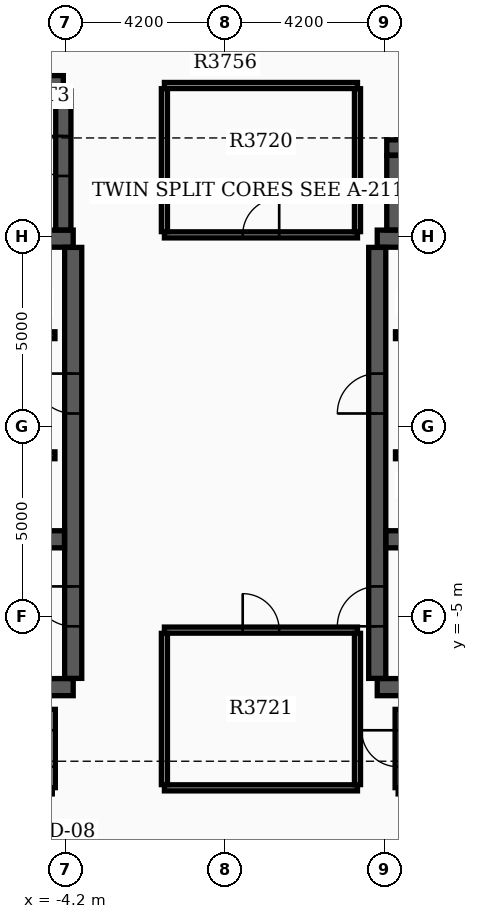
"""IFC4 building model, lengths in metres.
Left out: names, types, materials, properties, quantities, classifications, styles, units other than length and angle.
Written with IfcOpenShell. Run it as: python <this file> out.ifc"""

import sys

from ifc_helpers import new_model, si_unit, direction, frame, frame_2d, origin, place, context, subcontext, project, spatial, rectangle, extrude, element, fill, save


model = new_model("IFC4")
c1 = context("Model", 3, precision=1e-05, world=origin(), true_north=direction((0.0, 1.0)))
c2 = subcontext(c1, "Body", "Model", "MODEL_VIEW")
j1 = project(units=[si_unit("LENGTHUNIT", "METRE"), si_unit("PLANEANGLEUNIT", "RADIAN")], contexts=[c1])
p1 = place(None, origin())
s1 = spatial("IfcSite", under=j1, at=p1, CompositionType="ELEMENT")
p2 = place(p1, origin())
s2 = spatial("IfcBuilding", under=s1, at=p2, CompositionType="ELEMENT")
p3 = place(p2, frame((0.0, 0.0, 232.5)))
s3 = spatial("IfcBuildingStorey", under=s2, at=p3, CompositionType="ELEMENT", Elevation=232.5)
for number, where, z_axis, x_axis in (
    (1, (-12.4, -6.85, 0.0), (0.0, 0.0, 1.0), (1.0, 0.0, 0.0)),
    (2, (-12.4, 4.95, 0.0), (0.0, 0.0, 1.0), (1.0, 0.0, 0.0)),
):
    element("IfcWall", number, at=place(p3, frame(where, z_axis=z_axis, x_axis=x_axis)), inside=s3, PredefinedType="SHEAR", context=c2, shape_type="SweptSolid", body=[
        extrude(rectangle(XDim=8.4, YDim=0.45, at=frame_2d((4.2, 0.0))), origin(), (0.0, 0.0, 1.0), 3.7),
    ])
p4 = place(p3, frame((-4.0, -6.62, 0.0), z_axis=(0.0, 0.0, 1.0), x_axis=(0.0, 1.0, 0.0)))
e3 = element("IfcWall", 3, at=p4, inside=s3, PredefinedType="SHEAR", context=c2, shape_type="SweptSolid", body=[
    extrude(rectangle(XDim=11.34, YDim=0.45, at=frame_2d((5.67, 0.0))), origin(), (0.0, 0.0, 1.0), 3.7),
])
p5 = place(p4, frame((1.37, 0.0, 0.0)))
e4 = element("IfcOpeningElement", 4, at=p5, cuts=e3, PredefinedType="OPENING", context=c2, shape_type="SweptSolid", body=[
    extrude(rectangle(XDim=1.05, YDim=2.15, at=frame_2d((0.525, 1.075))), frame((0.0, 0.235, 0.0), z_axis=(0.0, -1.0, 0.0), x_axis=(1.0, 0.0, 0.0)), (0.0, 0.0, 1.0), 0.47),
])
p6 = place(p4, frame((6.97, 0.0, 0.0)))
e5 = element("IfcOpeningElement", 5, at=p6, cuts=e3, PredefinedType="OPENING", context=c2, shape_type="SweptSolid", body=[
    extrude(rectangle(XDim=1.05, YDim=2.15, at=frame_2d((0.525, 1.075))), frame((0.0, 0.235, 0.0), z_axis=(0.0, -1.0, 0.0), x_axis=(1.0, 0.0, 0.0)), (0.0, 0.0, 1.0), 0.47),
])
p7 = place(p3, frame((-12.17, -2.96, 0.0), z_axis=(0.0, 0.0, 1.0), x_axis=(1.0, 0.0, 0.0)))
e6 = element("IfcWall", 6, at=p7, inside=s3, PredefinedType="SHEAR", context=c2, shape_type="SweptSolid", body=[
    extrude(rectangle(XDim=7.94, YDim=0.45, at=frame_2d((3.97, 0.0))), origin(), (0.0, 0.0, 1.0), 3.7),
])
for number, where, z_axis, x_axis in (
    (7, (4.0, -6.85, 0.0), (0.0, 0.0, 1.0), (1.0, 0.0, 0.0)),
    (8, (4.0, 4.95, 0.0), (0.0, 0.0, 1.0), (1.0, 0.0, 0.0)),
):
    element("IfcWall", number, at=place(p3, frame(where, z_axis=z_axis, x_axis=x_axis)), inside=s3, PredefinedType="SHEAR", context=c2, shape_type="SweptSolid", body=[
        extrude(rectangle(XDim=8.4, YDim=0.45, at=frame_2d((4.2, 0.0))), origin(), (0.0, 0.0, 1.0), 3.7),
    ])
p8 = place(p3, frame((4.0, -6.62, 0.0), z_axis=(0.0, 0.0, 1.0), x_axis=(0.0, 1.0, 0.0)))
e9 = element("IfcWall", 9, at=p8, inside=s3, PredefinedType="SHEAR", context=c2, shape_type="SweptSolid", body=[
    extrude(rectangle(XDim=11.34, YDim=0.45, at=frame_2d((5.67, 0.0))), origin(), (0.0, 0.0, 1.0), 3.7),
])
p9 = place(p8, frame((1.37, 0.0, 0.0)))
e10 = element("IfcOpeningElement", 10, at=p9, cuts=e9, PredefinedType="OPENING", context=c2, shape_type="SweptSolid", body=[
    extrude(rectangle(XDim=1.05, YDim=2.15, at=frame_2d((0.525, 1.075))), frame((0.0, 0.235, 0.0), z_axis=(0.0, -1.0, 0.0), x_axis=(1.0, 0.0, 0.0)), (0.0, 0.0, 1.0), 0.47),
])
p10 = place(p8, frame((6.97, 0.0, 0.0)))
e11 = element("IfcOpeningElement", 11, at=p10, cuts=e9, PredefinedType="OPENING", context=c2, shape_type="SweptSolid", body=[
    extrude(rectangle(XDim=1.05, YDim=2.15, at=frame_2d((0.525, 1.075))), frame((0.0, 0.235, 0.0), z_axis=(0.0, -1.0, 0.0), x_axis=(1.0, 0.0, 0.0)), (0.0, 0.0, 1.0), 0.47),
])
p11 = place(p3, frame((4.23, -2.96, 0.0), z_axis=(0.0, 0.0, 1.0), x_axis=(1.0, 0.0, 0.0)))
e12 = element("IfcWall", 12, at=p11, inside=s3, PredefinedType="SHEAR", context=c2, shape_type="SweptSolid", body=[
    extrude(rectangle(XDim=7.94, YDim=0.45, at=frame_2d((3.97, 0.0))), origin(), (0.0, 0.0, 1.0), 3.7),
])
p12 = place(p3, frame((-12.22, 9.04, 0.0), z_axis=(0.0, 0.0, 1.0), x_axis=(1.0, 0.0, 0.0)))
e13 = element("IfcWall", 13, at=p12, inside=s3, PredefinedType="SHEAR", context=c2, shape_type="SweptSolid", body=[
    extrude(rectangle(XDim=7.96, YDim=0.4, at=frame_2d((3.98, 0.0))), origin(), (0.0, 0.0, 1.0), 3.7),
])
p13 = place(p3, frame((-4.26, 5.18, 0.0), z_axis=(0.0, 0.0, 1.0), x_axis=(0.0, 1.0, 0.0)))
e14 = element("IfcWall", 14, at=p13, inside=s3, PredefinedType="SHEAR", context=c2, shape_type="SweptSolid", body=[
    extrude(rectangle(XDim=3.655, YDim=0.4, at=frame_2d((1.828, 0.0))), origin(), (0.0, 0.0, 1.0), 3.7),
])
p14 = place(p13, frame((1.42, 0.0, 0.0)))
e15 = element("IfcOpeningElement", 15, at=p14, cuts=e14, PredefinedType="OPENING", context=c2, shape_type="SweptSolid", body=[
    extrude(rectangle(XDim=1.05, YDim=2.15, at=frame_2d((0.525, 1.075))), frame((0.0, 0.21, 0.0), z_axis=(0.0, -1.0, 0.0), x_axis=(1.0, 0.0, 0.0)), (0.0, 0.0, 1.0), 0.42),
])
p15 = place(p3, frame((4.45, 5.18, 0.0), z_axis=(0.0, 0.0, 1.0), x_axis=(0.0, 1.0, 0.0)))
e16 = element("IfcWall", 16, at=p15, inside=s3, PredefinedType="SHEAR", context=c2, shape_type="SweptSolid", body=[
    extrude(rectangle(XDim=1.96, YDim=0.4, at=frame_2d((0.98, 0.0))), origin(), (0.0, 0.0, 1.0), 3.7),
])
p16 = place(p3, frame((4.25, 7.35, 0.0), z_axis=(0.0, 0.0, 1.0), x_axis=(1.0, 0.0, 0.0)))
e17 = element("IfcWall", 17, at=p16, inside=s3, PredefinedType="SHEAR", context=c2, shape_type="SweptSolid", body=[
    extrude(rectangle(XDim=5.4, YDim=0.4, at=frame_2d((2.7, 0.0))), origin(), (0.0, 0.0, 1.0), 3.7),
])
p17 = place(p3, frame((-11.9, 2.41, 0.0), z_axis=(0.0, 0.0, 1.0), x_axis=(1.0, 0.0, 0.0)))
e18 = element("IfcWall", 18, at=p17, inside=s3, PredefinedType="SOLIDWALL", context=c2, shape_type="SweptSolid", body=[
    extrude(rectangle(XDim=7.42, YDim=0.18, at=frame_2d((3.71, 0.0))), origin(), (0.0, 0.0, 1.0), 3.17),
])
p18 = place(p17, frame((0.55, 0.0, 0.0)))
e19 = element("IfcOpeningElement", 19, at=p18, cuts=e18, PredefinedType="OPENING", context=c2, shape_type="SweptSolid", body=[
    extrude(rectangle(XDim=1.1, YDim=2.15, at=frame_2d((0.55, 1.075))), frame((0.0, 0.1, 0.0), z_axis=(0.0, -1.0, 0.0), x_axis=(1.0, 0.0, 0.0)), (0.0, 0.0, 1.0), 0.2),
])
p19 = place(p17, frame((4.9, 0.0, 0.0)))
e20 = element("IfcOpeningElement", 20, at=p19, cuts=e18, PredefinedType="OPENING", context=c2, shape_type="SweptSolid", body=[
    extrude(rectangle(XDim=0.88, YDim=2.1, at=frame_2d((0.44, 1.05))), frame((0.0, 0.1, 0.0), z_axis=(0.0, -1.0, 0.0), x_axis=(1.0, 0.0, 0.0)), (0.0, 0.0, 1.0), 0.2),
])
p20 = place(p3, frame((4.48, 2.41, 0.0), z_axis=(0.0, 0.0, 1.0), x_axis=(1.0, 0.0, 0.0)))
e21 = element("IfcWall", 21, at=p20, inside=s3, PredefinedType="SOLIDWALL", context=c2, shape_type="SweptSolid", body=[
    extrude(rectangle(XDim=7.42, YDim=0.18, at=frame_2d((3.71, 0.0))), origin(), (0.0, 0.0, 1.0), 3.17),
])
p21 = place(p20, frame((5.67, 0.0, 0.0)))
e22 = element("IfcOpeningElement", 22, at=p21, cuts=e21, PredefinedType="OPENING", context=c2, shape_type="SweptSolid", body=[
    extrude(rectangle(XDim=1.1, YDim=2.15, at=frame_2d((0.55, 1.075))), frame((0.0, 0.1, 0.0), z_axis=(0.0, -1.0, 0.0), x_axis=(1.0, 0.0, 0.0)), (0.0, 0.0, 1.0), 0.2),
])
p22 = place(p20, frame((1.6, 0.0, 0.0)))
e23 = element("IfcOpeningElement", 23, at=p22, cuts=e21, PredefinedType="OPENING", context=c2, shape_type="SweptSolid", body=[
    extrude(rectangle(XDim=0.88, YDim=2.1, at=frame_2d((0.44, 1.05))), frame((0.0, 0.1, 0.0), z_axis=(0.0, -1.0, 0.0), x_axis=(1.0, 0.0, 0.0)), (0.0, 0.0, 1.0), 0.2),
])
p23 = place(p3, frame((-11.9, -0.75, 0.0), z_axis=(0.0, 0.0, 1.0), x_axis=(1.0, 0.0, 0.0)))
e24 = element("IfcWall", 24, at=p23, inside=s3, PredefinedType="SOLIDWALL", context=c2, shape_type="SweptSolid", body=[
    extrude(rectangle(XDim=7.42, YDim=0.18, at=frame_2d((3.71, 0.0))), origin(), (0.0, 0.0, 1.0), 3.17),
])
p24 = place(p23, frame((5.75, 0.0, 0.0)))
e25 = element("IfcOpeningElement", 25, at=p24, cuts=e24, PredefinedType="OPENING", context=c2, shape_type="SweptSolid", body=[
    extrude(rectangle(XDim=1.1, YDim=2.15, at=frame_2d((0.55, 1.075))), frame((0.0, 0.1, 0.0), z_axis=(0.0, -1.0, 0.0), x_axis=(1.0, 0.0, 0.0)), (0.0, 0.0, 1.0), 0.2),
])
p25 = place(p23, frame((1.6, 0.0, 0.0)))
e26 = element("IfcOpeningElement", 26, at=p25, cuts=e24, PredefinedType="OPENING", context=c2, shape_type="SweptSolid", body=[
    extrude(rectangle(XDim=0.88, YDim=2.1, at=frame_2d((0.44, 1.05))), frame((0.0, 0.1, 0.0), z_axis=(0.0, -1.0, 0.0), x_axis=(1.0, 0.0, 0.0)), (0.0, 0.0, 1.0), 0.2),
])
p26 = place(p3, frame((4.48, -0.75, 0.0), z_axis=(0.0, 0.0, 1.0), x_axis=(1.0, 0.0, 0.0)))
e27 = element("IfcWall", 27, at=p26, inside=s3, PredefinedType="SOLIDWALL", context=c2, shape_type="SweptSolid", body=[
    extrude(rectangle(XDim=7.42, YDim=0.18, at=frame_2d((3.71, 0.0))), origin(), (0.0, 0.0, 1.0), 3.17),
])
p27 = place(p26, frame((3.92, 0.0, 0.0)))
e28 = element("IfcOpeningElement", 28, at=p27, cuts=e27, PredefinedType="OPENING", context=c2, shape_type="SweptSolid", body=[
    extrude(rectangle(XDim=1.1, YDim=2.15, at=frame_2d((0.55, 1.075))), frame((0.0, 0.1, 0.0), z_axis=(0.0, -1.0, 0.0), x_axis=(1.0, 0.0, 0.0)), (0.0, 0.0, 1.0), 0.2),
])
p28 = place(p26, frame((5.82, 0.0, 0.0)))
e29 = element("IfcOpeningElement", 29, at=p28, cuts=e27, PredefinedType="OPENING", context=c2, shape_type="SweptSolid", body=[
    extrude(rectangle(XDim=1.1, YDim=2.15, at=frame_2d((0.55, 1.075))), frame((0.0, 0.1, 0.0), z_axis=(0.0, -1.0, 0.0), x_axis=(1.0, 0.0, 0.0)), (0.0, 0.0, 1.0), 0.2),
])
p29 = place(p26, frame((1.6, 0.0, 0.0)))
e30 = element("IfcOpeningElement", 30, at=p29, cuts=e27, PredefinedType="OPENING", context=c2, shape_type="SweptSolid", body=[
    extrude(rectangle(XDim=0.88, YDim=2.1, at=frame_2d((0.44, 1.05))), frame((0.0, 0.1, 0.0), z_axis=(0.0, -1.0, 0.0), x_axis=(1.0, 0.0, 0.0)), (0.0, 0.0, 1.0), 0.2),
])
p30 = place(p3, frame((-1.6, 5.05, 0.0), z_axis=(0.0, 0.0, 1.0), x_axis=(1.0, 0.0, 0.0)))
e31 = element("IfcWall", 31, at=p30, inside=s3, PredefinedType="PARTITIONING", context=c2, shape_type="SweptSolid", body=[
    extrude(rectangle(XDim=5.08, YDim=0.16, at=frame_2d((2.54, 0.0))), origin(), (0.0, 0.0, 1.0), 3.17),
])
p31 = place(p30, frame((2.06, 0.0, 0.0)))
e32 = element("IfcOpeningElement", 32, at=p31, cuts=e31, PredefinedType="OPENING", context=c2, shape_type="SweptSolid", body=[
    extrude(rectangle(XDim=0.96, YDim=2.15, at=frame_2d((0.48, 1.075))), frame((0.0, 0.09, 0.0), z_axis=(0.0, -1.0, 0.0), x_axis=(1.0, 0.0, 0.0)), (0.0, 0.0, 1.0), 0.18),
])
p32 = place(p3, frame((-1.6, 8.98, 0.0), z_axis=(0.0, 0.0, 1.0), x_axis=(1.0, 0.0, 0.0)))
e33 = element("IfcWall", 33, at=p32, inside=s3, PredefinedType="PARTITIONING", context=c2, shape_type="SweptSolid", body=[
    extrude(rectangle(XDim=5.08, YDim=0.16, at=frame_2d((2.54, 0.0))), origin(), (0.0, 0.0, 1.0), 3.17),
])
for number, where, z_axis, x_axis in (
    (34, (-1.6, 5.135, 0.0), (0.0, 0.0, 1.0), (0.0, 1.0, 0.0)),
    (35, (3.48, 5.135, 0.0), (0.0, 0.0, 1.0), (0.0, 1.0, 0.0)),
):
    element("IfcWall", number, at=place(p3, frame(where, z_axis=z_axis, x_axis=x_axis)), inside=s3, PredefinedType="PARTITIONING", context=c2, shape_type="SweptSolid", body=[
        extrude(rectangle(XDim=3.76, YDim=0.16, at=frame_2d((1.88, 0.0))), origin(), (0.0, 0.0, 1.0), 3.17),
    ])
p33 = place(p3, frame((-1.6, -9.5, 0.0), z_axis=(0.0, 0.0, 1.0), x_axis=(1.0, 0.0, 0.0)))
e36 = element("IfcWall", 36, at=p33, inside=s3, PredefinedType="PARTITIONING", context=c2, shape_type="SweptSolid", body=[
    extrude(rectangle(XDim=5.08, YDim=0.16, at=frame_2d((2.54, 0.0))), origin(), (0.0, 0.0, 1.0), 3.17),
])
p34 = place(p3, frame((-1.6, -5.35, 0.0), z_axis=(0.0, 0.0, 1.0), x_axis=(1.0, 0.0, 0.0)))
e37 = element("IfcWall", 37, at=p34, inside=s3, PredefinedType="PARTITIONING", context=c2, shape_type="SweptSolid", body=[
    extrude(rectangle(XDim=5.08, YDim=0.16, at=frame_2d((2.54, 0.0))), origin(), (0.0, 0.0, 1.0), 3.17),
])
p35 = place(p34, frame((2.06, 0.0, 0.0)))
e38 = element("IfcOpeningElement", 38, at=p35, cuts=e37, PredefinedType="OPENING", context=c2, shape_type="SweptSolid", body=[
    extrude(rectangle(XDim=0.96, YDim=2.15, at=frame_2d((0.48, 1.075))), frame((0.0, 0.09, 0.0), z_axis=(0.0, -1.0, 0.0), x_axis=(1.0, 0.0, 0.0)), (0.0, 0.0, 1.0), 0.18),
])
for number, where, z_axis, x_axis in (
    (39, (-1.6, -9.415, 0.0), (0.0, 0.0, 1.0), (0.0, 1.0, 0.0)),
    (40, (3.48, -9.415, 0.0), (0.0, 0.0, 1.0), (0.0, 1.0, 0.0)),
):
    element("IfcWall", number, at=place(p3, frame(where, z_axis=z_axis, x_axis=x_axis)), inside=s3, PredefinedType="PARTITIONING", context=c2, shape_type="SweptSolid", body=[
        extrude(rectangle(XDim=3.98, YDim=0.16, at=frame_2d((1.99, 0.0))), origin(), (0.0, 0.0, 1.0), 3.17),
    ])
p36 = place(p3, frame((4.55, -9.58, 0.0), z_axis=(0.0, 0.0, 1.0), x_axis=(1.0, 0.0, 0.0)))
e41 = element("IfcWall", 41, at=p36, inside=s3, PredefinedType="PARTITIONING", context=c2, shape_type="SweptSolid", body=[
    extrude(rectangle(XDim=8.1, YDim=0.16, at=frame_2d((4.05, 0.0))), origin(), (0.0, 0.0, 1.0), 3.17),
])
p37 = place(p3, frame((4.55, -9.495, 0.0), z_axis=(0.0, 0.0, 1.0), x_axis=(0.0, 1.0, 0.0)))
e42 = element("IfcWall", 42, at=p37, inside=s3, PredefinedType="PARTITIONING", context=c2, shape_type="SweptSolid", body=[
    extrude(rectangle(XDim=2.06, YDim=0.16, at=frame_2d((1.03, 0.0))), origin(), (0.0, 0.0, 1.0), 3.17),
])
p38 = place(p37, frame((0.55, 0.0, 0.0)))
e43 = element("IfcOpeningElement", 43, at=p38, cuts=e42, PredefinedType="OPENING", context=c2, shape_type="SweptSolid", body=[
    extrude(rectangle(XDim=0.96, YDim=2.15, at=frame_2d((0.48, 1.075))), frame((0.0, 0.09, 0.0), z_axis=(0.0, -1.0, 0.0), x_axis=(1.0, 0.0, 0.0)), (0.0, 0.0, 1.0), 0.18),
])
p39 = place(p3, frame((-4.55, -9.495, 0.0), z_axis=(0.0, 0.0, 1.0), x_axis=(0.0, 1.0, 0.0)))
e44 = element("IfcWall", 44, at=p39, inside=s3, PredefinedType="PARTITIONING", context=c2, shape_type="SweptSolid", body=[
    extrude(rectangle(XDim=2.06, YDim=0.16, at=frame_2d((1.03, 0.0))), origin(), (0.0, 0.0, 1.0), 3.17),
])
p40 = place(p39, frame((0.55, 0.0, 0.0)))
e45 = element("IfcOpeningElement", 45, at=p40, cuts=e44, PredefinedType="OPENING", context=c2, shape_type="SweptSolid", body=[
    extrude(rectangle(XDim=0.96, YDim=2.15, at=frame_2d((0.48, 1.075))), frame((0.0, 0.09, 0.0), z_axis=(0.0, -1.0, 0.0), x_axis=(1.0, 0.0, 0.0)), (0.0, 0.0, 1.0), 0.18),
])
p41 = place(p5, origin())
e46 = element("IfcDoor", 46, at=p41, inside=s3, OperationType="SINGLE_SWING_RIGHT", PredefinedType="DOOR", context=c2, shape_type="SweptSolid", body=[
    extrude(rectangle(XDim=1.05, YDim=2.15, at=frame_2d((0.525, 1.075))), frame((0.0, 0.025, 0.0), z_axis=(0.0, -1.0, 0.0), x_axis=(1.0, 0.0, 0.0)), (0.0, 0.0, 1.0), 0.05),
])
fill(e4, e46)
p42 = place(p9, origin())
e47 = element("IfcDoor", 47, at=p42, inside=s3, OperationType="SINGLE_SWING_LEFT", PredefinedType="DOOR", context=c2, shape_type="SweptSolid", body=[
    extrude(rectangle(XDim=1.05, YDim=2.15, at=frame_2d((0.525, 1.075))), frame((0.0, 0.025, 0.0), z_axis=(0.0, -1.0, 0.0), x_axis=(1.0, 0.0, 0.0)), (0.0, 0.0, 1.0), 0.05),
])
fill(e10, e47)
p43 = place(p6, origin())
e48 = element("IfcDoor", 48, at=p43, inside=s3, OperationType="SINGLE_SWING_RIGHT", PredefinedType="DOOR", context=c2, shape_type="SweptSolid", body=[
    extrude(rectangle(XDim=1.05, YDim=2.15, at=frame_2d((0.525, 1.075))), frame((0.0, 0.025, 0.0), z_axis=(0.0, -1.0, 0.0), x_axis=(1.0, 0.0, 0.0)), (0.0, 0.0, 1.0), 0.05),
])
fill(e5, e48)
p44 = place(p10, origin())
e49 = element("IfcDoor", 49, at=p44, inside=s3, OperationType="SINGLE_SWING_LEFT", PredefinedType="DOOR", context=c2, shape_type="SweptSolid", body=[
    extrude(rectangle(XDim=1.05, YDim=2.15, at=frame_2d((0.525, 1.075))), frame((0.0, 0.025, 0.0), z_axis=(0.0, -1.0, 0.0), x_axis=(1.0, 0.0, 0.0)), (0.0, 0.0, 1.0), 0.05),
])
fill(e11, e49)
p45 = place(p14, origin())
e50 = element("IfcDoor", 50, at=p45, inside=s3, OperationType="SINGLE_SWING_RIGHT", PredefinedType="DOOR", context=c2, shape_type="SweptSolid", body=[
    extrude(rectangle(XDim=1.05, YDim=2.15, at=frame_2d((0.525, 1.075))), frame((0.0, 0.025, 0.0), z_axis=(0.0, -1.0, 0.0), x_axis=(1.0, 0.0, 0.0)), (0.0, 0.0, 1.0), 0.05),
])
fill(e15, e50)
p46 = place(p31, origin())
e51 = element("IfcDoor", 51, at=p46, inside=s3, OperationType="SINGLE_SWING_RIGHT", PredefinedType="DOOR", context=c2, shape_type="SweptSolid", body=[
    extrude(rectangle(XDim=0.96, YDim=2.15, at=frame_2d((0.48, 1.075))), frame((0.0, 0.025, 0.0), z_axis=(0.0, -1.0, 0.0), x_axis=(1.0, 0.0, 0.0)), (0.0, 0.0, 1.0), 0.05),
])
fill(e32, e51)
p47 = place(p35, origin())
e52 = element("IfcDoor", 52, at=p47, inside=s3, OperationType="SINGLE_SWING_LEFT", PredefinedType="DOOR", context=c2, shape_type="SweptSolid", body=[
    extrude(rectangle(XDim=0.96, YDim=2.15, at=frame_2d((0.48, 1.075))), frame((0.0, 0.025, 0.0), z_axis=(0.0, -1.0, 0.0), x_axis=(1.0, 0.0, 0.0)), (0.0, 0.0, 1.0), 0.05),
])
fill(e38, e52)
p48 = place(p38, origin())
e53 = element("IfcDoor", 53, at=p48, inside=s3, OperationType="SINGLE_SWING_RIGHT", PredefinedType="DOOR", context=c2, shape_type="SweptSolid", body=[
    extrude(rectangle(XDim=0.96, YDim=2.15, at=frame_2d((0.48, 1.075))), frame((0.0, 0.025, 0.0), z_axis=(0.0, -1.0, 0.0), x_axis=(1.0, 0.0, 0.0)), (0.0, 0.0, 1.0), 0.05),
])
fill(e43, e53)
p49 = place(p40, origin())
e54 = element("IfcDoor", 54, at=p49, inside=s3, OperationType="SINGLE_SWING_LEFT", PredefinedType="DOOR", context=c2, shape_type="SweptSolid", body=[
    extrude(rectangle(XDim=0.96, YDim=2.15, at=frame_2d((0.48, 1.075))), frame((0.0, 0.025, 0.0), z_axis=(0.0, -1.0, 0.0), x_axis=(1.0, 0.0, 0.0)), (0.0, 0.0, 1.0), 0.05),
])
fill(e45, e54)
save(model, sys.argv[1])
